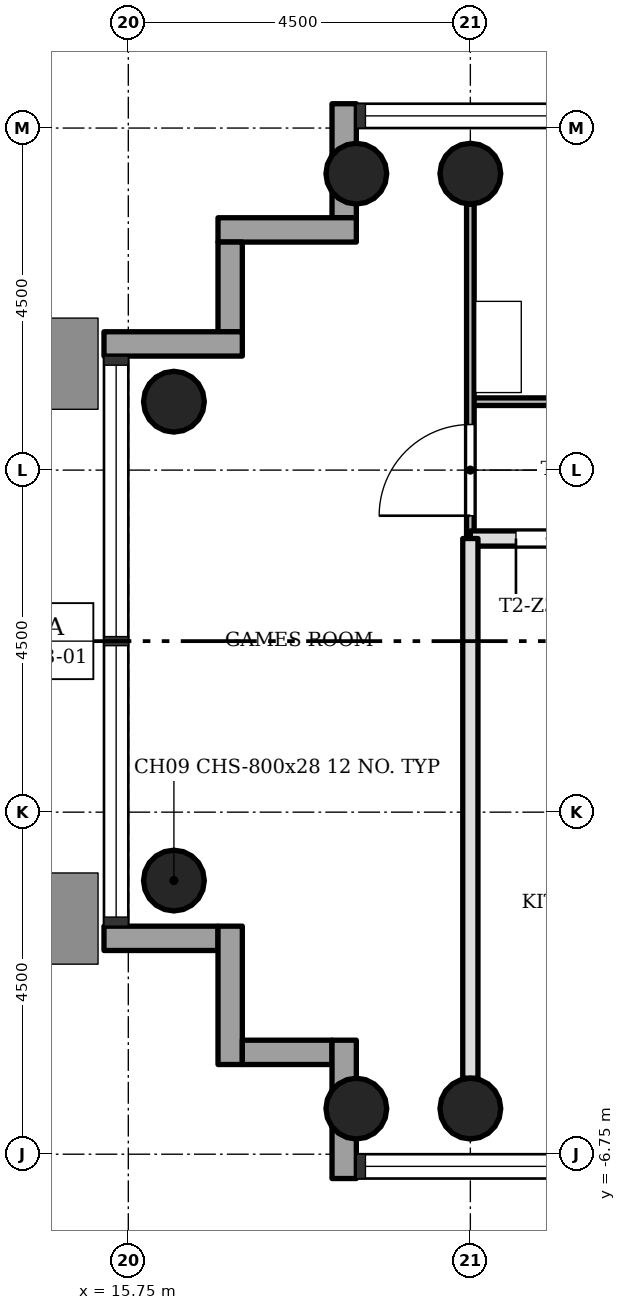
"""IFC4 building model, lengths in metres.
Left out: names, types, materials, properties, quantities, classifications, styles, units other than length and angle.
Written with IfcOpenShell. Run it as: python <this file> out.ifc"""

import sys

from ifc_helpers import new_model, si_unit, direction, frame, frame_2d, origin, origin_2d, place, context, subcontext, project, spatial, rectangle, hollow_circle, extrude, element, fill, save


model = new_model("IFC4")
c1 = context("Model", 3, precision=1e-05, world=origin(), true_north=direction((0.0, 1.0)))
c2 = subcontext(c1, "Body", "Model", "MODEL_VIEW")
j1 = project(units=[si_unit("LENGTHUNIT", "METRE"), si_unit("PLANEANGLEUNIT", "RADIAN")], contexts=[c1])
p1 = place(None, origin())
s1 = spatial("IfcSite", under=j1, at=p1, CompositionType="ELEMENT")
p2 = place(p1, origin())
s2 = spatial("IfcBuilding", under=s1, at=p2, CompositionType="ELEMENT")
p3 = place(p2, frame((0.0, 0.0, 137.1)))
s3 = spatial("IfcBuildingStorey", under=s2, at=p3, CompositionType="ELEMENT", Elevation=137.1)
for number, where, z_axis, x_axis in (
    (1, (20.25, 6.15, 0.0), (0.0, 0.0, 1.0), (1.0, 0.0, 0.0)),
    (2, (20.25, -6.15, 0.0), (0.0, 0.0, 1.0), (1.0, 0.0, 0.0)),
    (3, (18.75, 6.15, 0.0), (0.0, 0.0, 1.0), (1.0, 0.0, 0.0)),
    (4, (18.75, -6.15, 0.0), (0.0, 0.0, 1.0), (1.0, 0.0, 0.0)),
    (5, (16.35, 3.15, 0.0), (0.0, 0.0, 1.0), (1.0, 0.0, 0.0)),
    (6, (16.35, -3.15, 0.0), (0.0, 0.0, 1.0), (1.0, 0.0, 0.0)),
):
    element("IfcColumn", number, at=place(p3, frame(where, z_axis=z_axis, x_axis=x_axis)), inside=s3, PredefinedType="COLUMN", context=c2, shape_type="SweptSolid", body=[
        extrude(hollow_circle(Radius=0.4, WallThickness=0.028, at=origin_2d()), origin(), (0.0, 0.0, 1.0), 3.4),
    ])
p4 = place(p3, frame((18.59, 7.07, -0.3), z_axis=(0.0, 0.0, 1.0), x_axis=(0.0, -1.0, 0.0)))
e7 = element("IfcWall", 7, at=p4, inside=s3, PredefinedType="STANDARD", context=c2, shape_type="SweptSolid", body=[
    extrude(rectangle(XDim=1.5, YDim=0.32, at=frame_2d((0.75, 0.0))), origin(), (0.0, 0.0, 1.0), 3.4),
])
p5 = place(p3, frame((18.75, 5.41, -0.3), z_axis=(0.0, 0.0, 1.0), x_axis=(-1.0, 0.0, 0.0)))
e8 = element("IfcWall", 8, at=p5, inside=s3, PredefinedType="STANDARD", context=c2, shape_type="SweptSolid", body=[
    extrude(rectangle(XDim=1.82, YDim=0.32, at=frame_2d((0.91, 0.0))), origin(), (0.0, 0.0, 1.0), 3.4),
])
p6 = place(p3, frame((17.09, 5.25, -0.3), z_axis=(0.0, 0.0, 1.0), x_axis=(0.0, -1.0, 0.0)))
e9 = element("IfcWall", 9, at=p6, inside=s3, PredefinedType="STANDARD", context=c2, shape_type="SweptSolid", body=[
    extrude(rectangle(XDim=1.18, YDim=0.32, at=frame_2d((0.59, 0.0))), origin(), (0.0, 0.0, 1.0), 3.4),
])
p7 = place(p3, frame((17.25, 3.91, -0.3), z_axis=(0.0, 0.0, 1.0), x_axis=(-1.0, 0.0, 0.0)))
e10 = element("IfcWall", 10, at=p7, inside=s3, PredefinedType="STANDARD", context=c2, shape_type="SweptSolid", body=[
    extrude(rectangle(XDim=1.82, YDim=0.32, at=frame_2d((0.91, 0.0))), origin(), (0.0, 0.0, 1.0), 3.4),
])
p8 = place(p3, frame((15.43, -3.91, -0.3), z_axis=(0.0, 0.0, 1.0), x_axis=(1.0, 0.0, 0.0)))
e11 = element("IfcWall", 11, at=p8, inside=s3, PredefinedType="STANDARD", context=c2, shape_type="SweptSolid", body=[
    extrude(rectangle(XDim=1.5, YDim=0.32, at=frame_2d((0.75, 0.0))), origin(), (0.0, 0.0, 1.0), 3.4),
])
p9 = place(p3, frame((17.09, -3.75, -0.3), z_axis=(0.0, 0.0, 1.0), x_axis=(0.0, -1.0, 0.0)))
e12 = element("IfcWall", 12, at=p9, inside=s3, PredefinedType="STANDARD", context=c2, shape_type="SweptSolid", body=[
    extrude(rectangle(XDim=1.82, YDim=0.32, at=frame_2d((0.91, 0.0))), origin(), (0.0, 0.0, 1.0), 3.4),
])
p10 = place(p3, frame((17.25, -5.41, -0.3), z_axis=(0.0, 0.0, 1.0), x_axis=(1.0, 0.0, 0.0)))
e13 = element("IfcWall", 13, at=p10, inside=s3, PredefinedType="STANDARD", context=c2, shape_type="SweptSolid", body=[
    extrude(rectangle(XDim=1.18, YDim=0.32, at=frame_2d((0.59, 0.0))), origin(), (0.0, 0.0, 1.0), 3.4),
])
p11 = place(p3, frame((18.59, -5.25, -0.3), z_axis=(0.0, 0.0, 1.0), x_axis=(0.0, -1.0, 0.0)))
e14 = element("IfcWall", 14, at=p11, inside=s3, PredefinedType="STANDARD", context=c2, shape_type="SweptSolid", body=[
    extrude(rectangle(XDim=1.82, YDim=0.32, at=frame_2d((0.91, 0.0))), origin(), (0.0, 0.0, 1.0), 3.4),
])
p12 = place(p3, frame((24.75, 1.35, 0.0), z_axis=(0.0, 0.0, 1.0), x_axis=(-1.0, 0.0, 0.0)))
e15 = element("IfcWall", 15, at=p12, inside=s3, PredefinedType="SOLIDWALL", context=c2, shape_type="SweptSolid", body=[
    extrude(rectangle(XDim=4.5, YDim=0.2, at=frame_2d((2.25, 0.0))), origin(), (0.0, 0.0, 1.0), 3.0),
])
p13 = place(p12, frame((3.0, 0.0, 0.0)))
e16 = element("IfcOpeningElement", 16, at=p13, cuts=e15, PredefinedType="OPENING", context=c2, shape_type="SweptSolid", body=[
    extrude(rectangle(XDim=0.9, YDim=2.1, at=frame_2d((0.45, 1.05))), frame((0.0, 0.11, 0.0), z_axis=(0.0, -1.0, 0.0), x_axis=(1.0, 0.0, 0.0)), (0.0, 0.0, 1.0), 0.22),
])
p14 = place(p3, frame((29.25, 3.15, 0.0), z_axis=(0.0, 0.0, 1.0), x_axis=(-1.0, 0.0, 0.0)))
e17 = element("IfcWall", 17, at=p14, inside=s3, PredefinedType="PARTITIONING", context=c2, shape_type="SweptSolid", body=[
    extrude(rectangle(XDim=9.0, YDim=0.1, at=frame_2d((4.5, 0.0))), origin(), (0.0, 0.0, 1.0), 3.0),
])
p15 = place(p14, frame((2.55, 0.0, 0.0)))
e18 = element("IfcOpeningElement", 18, at=p15, cuts=e17, PredefinedType="OPENING", context=c2, shape_type="SweptSolid", body=[
    extrude(rectangle(XDim=0.9, YDim=2.1, at=frame_2d((0.45, 1.05))), frame((0.0, 0.06, 0.0), z_axis=(0.0, -1.0, 0.0), x_axis=(1.0, 0.0, 0.0)), (0.0, 0.0, 1.0), 0.12),
])
p16 = place(p3, frame((20.25, 1.35, 0.0), z_axis=(0.0, 0.0, 1.0), x_axis=(0.0, 1.0, 0.0)))
e19 = element("IfcWall", 19, at=p16, inside=s3, PredefinedType="PARTITIONING", context=c2, shape_type="SweptSolid", body=[
    extrude(rectangle(XDim=4.4, YDim=0.1, at=frame_2d((2.2, 0.0))), origin(), (0.0, 0.0, 1.0), 3.0),
])
p17 = place(p16, frame((0.3, 0.0, 0.0)))
e20 = element("IfcOpeningElement", 20, at=p17, cuts=e19, PredefinedType="OPENING", context=c2, shape_type="SweptSolid", body=[
    extrude(rectangle(XDim=1.2, YDim=2.1, at=frame_2d((0.6, 1.05))), frame((0.0, 0.06, 0.0), z_axis=(0.0, -1.0, 0.0), x_axis=(1.0, 0.0, 0.0)), (0.0, 0.0, 1.0), 0.12),
])
p18 = place(p3, frame((20.25, -5.75, 0.0), z_axis=(0.0, 0.0, 1.0), x_axis=(0.0, 1.0, 0.0)))
e21 = element("IfcWall", 21, at=p18, inside=s3, PredefinedType="SOLIDWALL", context=c2, shape_type="SweptSolid", body=[
    extrude(rectangle(XDim=7.1, YDim=0.2, at=frame_2d((3.55, 0.0))), origin(), (0.0, 0.0, 1.0), 3.0),
])
p19 = place(p13, origin())
e22 = element("IfcDoor", 22, at=p19, inside=s3, OperationType="SINGLE_SWING_LEFT", PredefinedType="DOOR", context=c2, shape_type="SweptSolid", body=[
    extrude(rectangle(XDim=0.9, YDim=2.1, at=frame_2d((0.45, 1.05))), frame((0.0, 0.025, 0.0), z_axis=(0.0, -1.0, 0.0), x_axis=(1.0, 0.0, 0.0)), (0.0, 0.0, 1.0), 0.05),
])
fill(e16, e22)
p20 = place(p17, origin())
e23 = element("IfcDoor", 23, at=p20, inside=s3, OperationType="SINGLE_SWING_RIGHT", PredefinedType="DOOR", context=c2, shape_type="SweptSolid", body=[
    extrude(rectangle(XDim=1.2, YDim=2.1, at=frame_2d((0.6, 1.05))), frame((0.0, 0.025, 0.0), z_axis=(0.0, -1.0, 0.0), x_axis=(1.0, 0.0, 0.0)), (0.0, 0.0, 1.0), 0.05),
])
fill(e20, e23)
save(model, sys.argv[1])
